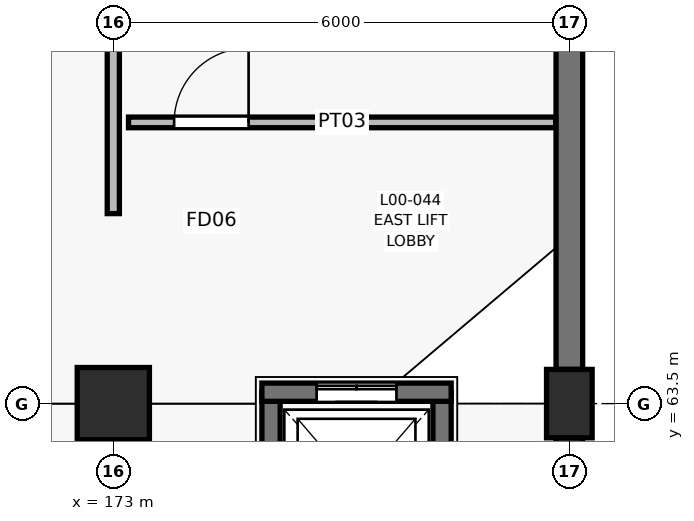
"""IFC4 building model, lengths in metres.
Left out: names, types, materials, properties, quantities, classifications, styles, units other than length and angle.
Written with IfcOpenShell. Run it as: python <this file> out.ifc"""

import sys

from ifc_helpers import new_model, si_unit, direction, frame, frame_2d, origin, origin_2d, place, context, subcontext, project, spatial, rectangle, extrude, element, fill, save


model = new_model("IFC4")
c1 = context("Model", 3, precision=1e-05, world=origin(), true_north=direction((0.0, 1.0)))
c2 = subcontext(c1, "Body", "Model", "MODEL_VIEW")
j1 = project(units=[si_unit("LENGTHUNIT", "METRE"), si_unit("PLANEANGLEUNIT", "RADIAN")], contexts=[c1])
p1 = place(None, origin())
s1 = spatial("IfcSite", under=j1, at=p1, CompositionType="ELEMENT")
p2 = place(p1, origin())
s2 = spatial("IfcBuilding", under=s1, at=p2, CompositionType="ELEMENT")
p3 = place(p2, origin())
s3 = spatial("IfcBuildingStorey", under=s2, at=p3, CompositionType="ELEMENT", Elevation=0.0)
p4 = place(p3, frame((173.0, 63.5, 0.0), z_axis=(0.0, 0.0, 1.0), x_axis=(1.0, 0.0, 0.0)))
e1 = element("IfcColumn", 1, at=p4, inside=s3, PredefinedType="COLUMN", context=c2, shape_type="SweptSolid", body=[
    extrude(rectangle(XDim=0.95, YDim=0.95, at=origin_2d()), origin(), (0.0, 0.0, 1.0), 4.8),
])
p5 = place(p3, frame((179.0, 63.5, 0.0), z_axis=(0.0, 0.0, 1.0), x_axis=(1.0, 0.0, 0.0)))
e2 = element("IfcColumn", 2, at=p5, inside=s3, PredefinedType="COLUMN", context=c2, shape_type="SweptSolid", body=[
    extrude(rectangle(XDim=0.6, YDim=0.9, at=origin_2d()), origin(), (0.0, 0.0, 1.0), 4.8),
])
p6 = place(p3, frame((179.0, 63.05, 0.0), z_axis=(0.0, 0.0, 1.0), x_axis=(0.0, -1.0, 0.0)))
e3 = element("IfcWall", 3, at=p6, inside=s3, PredefinedType="SOLIDWALL", context=c2, shape_type="SweptSolid", body=[
    extrude(rectangle(XDim=9.1, YDim=0.35, at=frame_2d((4.55, 0.0))), origin(), (0.0, 0.0, 1.0), 4.8),
])
p7 = place(p6, frame((1.8, 0.0, 1.0)))
e4 = element("IfcOpeningElement", 4, at=p7, cuts=e3, PredefinedType="OPENING", context=c2, shape_type="SweptSolid", body=[
    extrude(rectangle(XDim=2.1, YDim=1.5, at=frame_2d((1.05, 0.75))), frame((0.0, 0.185, 0.0), z_axis=(0.0, -1.0, 0.0), x_axis=(1.0, 0.0, 0.0)), (0.0, 0.0, 1.0), 0.37),
])
p8 = place(p3, frame((179.0, 73.05, 0.0), z_axis=(0.0, 0.0, 1.0), x_axis=(0.0, -1.0, 0.0)))
e5 = element("IfcWall", 5, at=p8, inside=s3, PredefinedType="SOLIDWALL", context=c2, shape_type="SweptSolid", body=[
    extrude(rectangle(XDim=9.1, YDim=0.35, at=frame_2d((4.55, 0.0))), origin(), (0.0, 0.0, 1.0), 4.8),
])
p9 = place(p8, frame((1.8, 0.0, 1.0)))
e6 = element("IfcOpeningElement", 6, at=p9, cuts=e5, PredefinedType="OPENING", context=c2, shape_type="SweptSolid", body=[
    extrude(rectangle(XDim=2.4, YDim=1.5, at=frame_2d((1.2, 0.75))), frame((0.0, 0.185, 0.0), z_axis=(0.0, -1.0, 0.0), x_axis=(1.0, 0.0, 0.0)), (0.0, 0.0, 1.0), 0.37),
])
p10 = place(p3, frame((175.075, 61.15, -1.3), z_axis=(0.0, 0.0, 1.0), x_axis=(0.0, 1.0, 0.0)))
e7 = element("IfcWall", 7, at=p10, inside=s3, PredefinedType="SHEAR", context=c2, shape_type="SweptSolid", body=[
    extrude(rectangle(XDim=2.5, YDim=0.24, at=frame_2d((1.25, 0.0))), origin(), (0.0, 0.0, 1.0), 6.1),
])
p11 = place(p3, frame((177.325, 63.65, 0.0), z_axis=(0.0, 0.0, 1.0), x_axis=(0.0, -1.0, 0.0)))
e8 = element("IfcWall", 8, at=p11, inside=s3, PredefinedType="SHEAR", context=c2, shape_type="SweptSolid", body=[
    extrude(rectangle(XDim=2.5, YDim=0.24, at=frame_2d((1.25, 0.0))), origin(), (0.0, 0.0, 1.0), 4.8),
])
p12 = place(p3, frame((174.955, 63.65, 0.0), z_axis=(0.0, 0.0, 1.0), x_axis=(1.0, 0.0, 0.0)))
e9 = element("IfcWall", 9, at=p12, inside=s3, PredefinedType="SHEAR", context=c2, shape_type="SweptSolid", body=[
    extrude(rectangle(XDim=2.49, YDim=0.24, at=frame_2d((1.245, 0.0))), origin(), (0.0, 0.0, 1.0), 4.8),
])
p13 = place(p12, frame((0.72, 0.0, 0.0)))
e10 = element("IfcOpeningElement", 10, at=p13, cuts=e9, PredefinedType="OPENING", context=c2, shape_type="SweptSolid", body=[
    extrude(rectangle(XDim=1.05, YDim=2.1, at=frame_2d((0.525, 1.05))), frame((0.0, 0.13, 0.0), z_axis=(0.0, -1.0, 0.0), x_axis=(1.0, 0.0, 0.0)), (0.0, 0.0, 1.0), 0.26),
])
p14 = place(p3, frame((173.2, 67.2, 0.0), z_axis=(0.0, 0.0, 1.0), x_axis=(1.0, 0.0, 0.0)))
e11 = element("IfcWall", 11, at=p14, inside=s3, PredefinedType="PARTITIONING", context=c2, shape_type="SweptSolid", body=[
    extrude(rectangle(XDim=5.62, YDim=0.14, at=frame_2d((2.81, 0.0))), origin(), (0.0, 0.0, 1.0), 3.645),
])
p15 = place(p14, frame((0.6, 0.0, 0.0)))
e12 = element("IfcOpeningElement", 12, at=p15, cuts=e11, PredefinedType="OPENING", context=c2, shape_type="SweptSolid", body=[
    extrude(rectangle(XDim=0.98, YDim=2.1, at=frame_2d((0.49, 1.05))), frame((0.0, 0.08, 0.0), z_axis=(0.0, -1.0, 0.0), x_axis=(1.0, 0.0, 0.0)), (0.0, 0.0, 1.0), 0.16),
])
p16 = place(p3, frame((173.0, 66.0, 0.0), z_axis=(0.0, 0.0, 1.0), x_axis=(0.0, 1.0, 0.0)))
e13 = element("IfcWall", 13, at=p16, inside=s3, PredefinedType="PARTITIONING", context=c2, shape_type="SweptSolid", body=[
    extrude(rectangle(XDim=6.8, YDim=0.16, at=frame_2d((3.4, 0.0))), origin(), (0.0, 0.0, 1.0), 3.645),
])
p17 = place(p16, frame((2.7, 0.0, 0.0)))
e14 = element("IfcOpeningElement", 14, at=p17, cuts=e13, PredefinedType="OPENING", context=c2, shape_type="SweptSolid", body=[
    extrude(rectangle(XDim=1.4, YDim=2.2, at=frame_2d((0.7, 1.1))), frame((0.0, 0.09, 0.0), z_axis=(0.0, -1.0, 0.0), x_axis=(1.0, 0.0, 0.0)), (0.0, 0.0, 1.0), 0.18),
])
p18 = place(p13, origin())
e15 = element("IfcDoor", 15, at=p18, inside=s3, OperationType="DOUBLE_DOOR_SLIDING", PredefinedType="USERDEFINED", context=c2, shape_type="SweptSolid", body=[
    extrude(rectangle(XDim=1.05, YDim=2.1, at=frame_2d((0.525, 1.05))), frame((0.0, 0.025, 0.0), z_axis=(0.0, -1.0, 0.0), x_axis=(1.0, 0.0, 0.0)), (0.0, 0.0, 1.0), 0.05),
])
fill(e10, e15)
p19 = place(p15, origin())
e16 = element("IfcDoor", 16, at=p19, inside=s3, OperationType="SINGLE_SWING_RIGHT", PredefinedType="DOOR", context=c2, shape_type="SweptSolid", body=[
    extrude(rectangle(XDim=0.98, YDim=2.1, at=frame_2d((0.49, 1.05))), frame((0.0, 0.025, 0.0), z_axis=(0.0, -1.0, 0.0), x_axis=(1.0, 0.0, 0.0)), (0.0, 0.0, 1.0), 0.05),
])
fill(e12, e16)
save(model, sys.argv[1])
